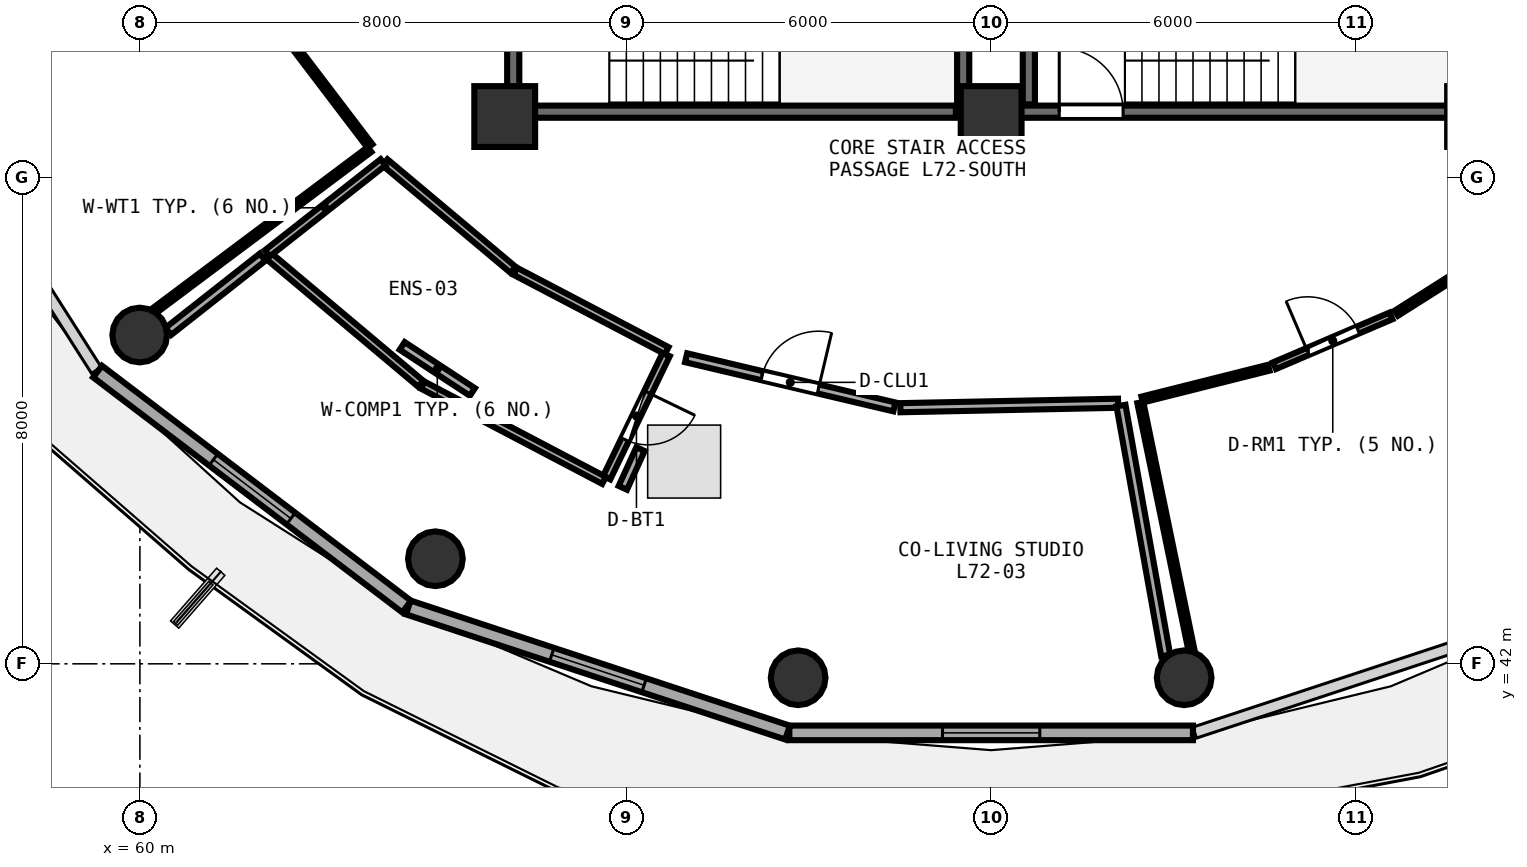
"""IFC4 building model, lengths in metres.
Left out: names, types, materials, properties, quantities, classifications, styles, units other than length and angle.
Written with IfcOpenShell. Run it as: python <this file> out.ifc"""

import sys

from ifc_helpers import new_model, si_unit, direction, frame, frame_2d, origin, origin_2d, place, context, subcontext, project, spatial, rectangle, circle, extrude, element, fill, save


model = new_model("IFC4")
c1 = context("Model", 3, precision=1e-05, world=origin(), true_north=direction((0.0, 1.0)))
c2 = subcontext(c1, "Body", "Model", "MODEL_VIEW")
j1 = project(units=[si_unit("LENGTHUNIT", "METRE"), si_unit("PLANEANGLEUNIT", "RADIAN")], contexts=[c1])
p1 = place(None, origin())
s1 = spatial("IfcSite", under=j1, at=p1, CompositionType="ELEMENT")
p2 = place(p1, origin())
s2 = spatial("IfcBuilding", under=s1, at=p2, CompositionType="ELEMENT")
p3 = place(p2, frame((0.0, 0.0, 282.45)))
s3 = spatial("IfcBuildingStorey", under=s2, at=p3, CompositionType="ELEMENT", Elevation=282.45)
for number, where, z_axis, x_axis in (
    (1, (66.0, 51.0, 0.0), (0.0, 0.0, 1.0), (1.0, 0.0, 0.0)),
    (2, (74.0, 51.0, 0.0), (0.0, 0.0, 1.0), (1.0, 0.0, 0.0)),
):
    element("IfcColumn", number, at=place(p3, frame(where, z_axis=z_axis, x_axis=x_axis)), inside=s3, PredefinedType="PILASTER", context=c2, shape_type="SweptSolid", body=[
        extrude(rectangle(XDim=1.0, YDim=1.0, at=origin_2d()), origin(), (0.0, 0.0, 1.0), 3.75),
    ])
for number, where, z_axis, x_axis in (
    (3, (59.997, 47.407, 0.0), (0.0, 0.0, 1.0), (1.0, 0.0, 0.0)),
    (4, (64.86, 43.728, 0.0), (0.0, 0.0, 1.0), (1.0, 0.0, 0.0)),
    (5, (70.826, 41.771, 0.0), (0.0, 0.0, 1.0), (1.0, 0.0, 0.0)),
    (6, (77.174, 41.771, 0.0), (0.0, 0.0, 1.0), (1.0, 0.0, 0.0)),
):
    element("IfcColumn", number, at=place(p3, frame(where, z_axis=z_axis, x_axis=x_axis)), inside=s3, PredefinedType="COLUMN", context=c2, shape_type="SweptSolid", body=[
        extrude(circle(Radius=0.45, at=origin_2d()), origin(), (0.0, 0.0, 1.0), 3.75),
    ])
p4 = place(p3, frame((59.304, 46.806, 0.0), z_axis=(0.0, 0.0, 1.0), x_axis=(0.796010444211, -0.605282886514, 0.0)))
e7 = element("IfcWall", 7, at=p4, inside=s3, PredefinedType="SOLIDWALL", context=c2, shape_type="SweptSolid", body=[
    extrude(rectangle(XDim=6.387, YDim=0.24, at=frame_2d((3.194, 0.0))), origin(), (0.0, 0.0, 1.0), 3.475),
])
p5 = place(p4, frame((2.394, 0.0, 0.85)))
e8 = element("IfcOpeningElement", 8, at=p5, cuts=e7, PredefinedType="OPENING", context=c2, shape_type="SweptSolid", body=[
    extrude(rectangle(XDim=1.6, YDim=1.45, at=frame_2d((0.8, 0.725))), frame((0.0, 0.13, 0.0), z_axis=(0.0, -1.0, 0.0), x_axis=(1.0, 0.0, 0.0)), (0.0, 0.0, 1.0), 0.26),
])
p6 = place(p3, frame((64.414, 42.927, 0.0), z_axis=(0.0, 0.0, 1.0), x_axis=(0.949663708393, -0.313271193954, 0.0)))
e9 = element("IfcWall", 9, at=p6, inside=s3, PredefinedType="SOLIDWALL", context=c2, shape_type="SweptSolid", body=[
    extrude(rectangle(XDim=6.568, YDim=0.24, at=frame_2d((3.284, 0.0))), origin(), (0.0, 0.0, 1.0), 3.475),
])
p7 = place(p6, frame((2.484, 0.0, 0.85)))
e10 = element("IfcOpeningElement", 10, at=p7, cuts=e9, PredefinedType="OPENING", context=c2, shape_type="SweptSolid", body=[
    extrude(rectangle(XDim=1.6, YDim=1.45, at=frame_2d((0.8, 0.725))), frame((0.0, 0.13, 0.0), z_axis=(0.0, -1.0, 0.0), x_axis=(1.0, 0.0, 0.0)), (0.0, 0.0, 1.0), 0.26),
])
p8 = place(p3, frame((70.681, 40.864, 0.0), z_axis=(0.0, 0.0, 1.0), x_axis=(1.0, 0.0, 0.0)))
e11 = element("IfcWall", 11, at=p8, inside=s3, PredefinedType="SOLIDWALL", context=c2, shape_type="SweptSolid", body=[
    extrude(rectangle(XDim=6.638, YDim=0.24, at=frame_2d((3.319, 0.0))), origin(), (0.0, 0.0, 1.0), 3.475),
])
p9 = place(p8, frame((2.519, 0.0, 0.85)))
e12 = element("IfcOpeningElement", 12, at=p9, cuts=e11, PredefinedType="OPENING", context=c2, shape_type="SweptSolid", body=[
    extrude(rectangle(XDim=1.6, YDim=1.45, at=frame_2d((0.8, 0.725))), frame((0.0, 0.13, 0.0), z_axis=(0.0, -1.0, 0.0), x_axis=(1.0, 0.0, 0.0)), (0.0, 0.0, 1.0), 0.26),
])
p10 = place(p3, frame((74.0, 51.08, 0.0), z_axis=(0.0, 0.0, 1.0), x_axis=(1.0, 0.0, 0.0)))
e13 = element("IfcWall", 13, at=p10, inside=s3, PredefinedType="SHEAR", context=c2, shape_type="SweptSolid", body=[
    extrude(rectangle(XDim=7.9, YDim=0.2, at=frame_2d((3.95, 0.0))), origin(), (0.0, 0.0, 1.0), 3.49),
])
p11 = place(p10, frame((1.12, 0.0, 0.0)))
e14 = element("IfcOpeningElement", 14, at=p11, cuts=e13, PredefinedType="OPENING", context=c2, shape_type="SweptSolid", body=[
    extrude(rectangle(XDim=1.05, YDim=2.1, at=frame_2d((0.525, 1.05))), frame((0.0, 0.11, 0.0), z_axis=(0.0, -1.0, 0.0), x_axis=(1.0, 0.0, 0.0)), (0.0, 0.0, 1.0), 0.22),
])
p12 = place(p3, frame((74.62, 54.27, 0.0), z_axis=(0.0, 0.0, 1.0), x_axis=(0.0, -1.0, 0.0)))
e15 = element("IfcWall", 15, at=p12, inside=s3, PredefinedType="SHEAR", context=c2, shape_type="SweptSolid", body=[
    extrude(rectangle(XDim=3.07, YDim=0.2, at=frame_2d((1.535, 0.0))), origin(), (0.0, 0.0, 1.0), 3.49),
])
p13 = place(p3, frame((66.26, 51.08, 0.0), z_axis=(0.0, 0.0, 1.0), x_axis=(1.0, 0.0, 0.0)))
e16 = element("IfcWall", 16, at=p13, inside=s3, PredefinedType="SHEAR", context=c2, shape_type="SweptSolid", body=[
    extrude(rectangle(XDim=7.16, YDim=0.2, at=frame_2d((3.58, 0.0))), origin(), (0.0, 0.0, 1.0), 3.49),
])
p14 = place(p3, frame((73.54, 51.2, 0.0), z_axis=(0.0, 0.0, 1.0), x_axis=(0.0, 1.0, 0.0)))
e17 = element("IfcWall", 17, at=p14, inside=s3, PredefinedType="SHEAR", context=c2, shape_type="SweptSolid", body=[
    extrude(rectangle(XDim=3.07, YDim=0.2, at=frame_2d((1.535, 0.0))), origin(), (0.0, 0.0, 1.0), 3.49),
])
p15 = place(p3, frame((66.14, 54.27, 0.0), z_axis=(0.0, 0.0, 1.0), x_axis=(0.0, -1.0, 0.0)))
e18 = element("IfcWall", 18, at=p15, inside=s3, PredefinedType="SHEAR", context=c2, shape_type="SweptSolid", body=[
    extrude(rectangle(XDim=3.07, YDim=0.2, at=frame_2d((1.535, 0.0))), origin(), (0.0, 0.0, 1.0), 3.49),
])
p16 = place(p15, frame((1.01, 0.0, 0.0)))
e19 = element("IfcOpeningElement", 19, at=p16, cuts=e18, PredefinedType="OPENING", context=c2, shape_type="SweptSolid", body=[
    extrude(rectangle(XDim=1.05, YDim=2.1, at=frame_2d((0.525, 1.05))), frame((0.0, 0.11, 0.0), z_axis=(0.0, -1.0, 0.0), x_axis=(1.0, 0.0, 0.0)), (0.0, 0.0, 1.0), 0.22),
])
p17 = place(p3, frame((68.656, 47.087, 0.0), z_axis=(0.0, 0.0, 1.0), x_axis=(-0.435107089182, -0.900378709735, 0.0)))
e20 = element("IfcWall", 20, at=p17, inside=s3, PredefinedType="PLUMBINGWALL", context=c2, shape_type="SweptSolid", body=[
    extrude(rectangle(XDim=2.25, YDim=0.13, at=frame_2d((1.125, 0.0))), origin(), (0.0, 0.0, 1.0), 3.175),
])
p18 = place(p17, frame((0.695, 0.0, 0.0)))
e21 = element("IfcOpeningElement", 21, at=p18, cuts=e20, PredefinedType="OPENING", context=c2, shape_type="SweptSolid", body=[
    extrude(rectangle(XDim=0.86, YDim=2.05, at=frame_2d((0.43, 1.025))), frame((0.0, 0.075, 0.0), z_axis=(0.0, -1.0, 0.0), x_axis=(1.0, 0.0, 0.0)), (0.0, 0.0, 1.0), 0.15),
])
p19 = place(p3, frame((68.983, 47.033, 0.0), z_axis=(0.0, 0.0, 1.0), x_axis=(0.973265021884, -0.229684995542, 0.0)))
e22 = element("IfcWall", 22, at=p19, inside=s3, PredefinedType="PARTITIONING", context=c2, shape_type="SweptSolid", body=[
    extrude(rectangle(XDim=3.519, YDim=0.15, at=frame_2d((1.76, 0.0))), origin(), (0.0, 0.0, 1.0), 3.075),
])
p20 = place(p19, frame((1.285, 0.0, 0.0)))
e23 = element("IfcOpeningElement", 23, at=p20, cuts=e22, PredefinedType="OPENING", context=c2, shape_type="SweptSolid", body=[
    extrude(rectangle(XDim=0.95, YDim=2.08, at=frame_2d((0.475, 1.04))), frame((0.0, 0.085, 0.0), z_axis=(0.0, -1.0, 0.0), x_axis=(1.0, 0.0, 0.0)), (0.0, 0.0, 1.0), 0.17),
])
p21 = place(p3, frame((78.66, 46.903, 0.0), z_axis=(0.0, 0.0, 1.0), x_axis=(0.919508345424, 0.39307048057, 0.0)))
e24 = element("IfcWall", 24, at=p21, inside=s3, PredefinedType="PARTITIONING", context=c2, shape_type="SweptSolid", body=[
    extrude(rectangle(XDim=2.083, YDim=0.12, at=frame_2d((1.042, 0.0))), origin(), (0.0, 0.0, 1.0), 3.48),
])
p22 = place(p21, frame((0.592, 0.0, 0.0)))
e25 = element("IfcOpeningElement", 25, at=p22, cuts=e24, PredefinedType="OPENING", context=c2, shape_type="SweptSolid", body=[
    extrude(rectangle(XDim=0.9, YDim=2.08, at=frame_2d((0.45, 1.04))), frame((0.0, 0.07, 0.0), z_axis=(0.0, -1.0, 0.0), x_axis=(1.0, 0.0, 0.0)), (0.0, 0.0, 1.0), 0.14),
])
p23 = place(p3, frame((62.565, 52.117, 0.0), z_axis=(0.0, 0.0, 1.0), x_axis=(0.605473441765, -0.795865510823, 0.0)))
e26 = element("IfcWall", 26, at=p23, inside=s3, PredefinedType="PARTITIONING", context=c2, shape_type="SweptSolid", body=[
    extrude(rectangle(XDim=2.014, YDim=0.1, at=frame_2d((1.007, 0.0))), origin(), (0.0, 0.0, 1.0), 3.075),
])
p24 = place(p3, frame((63.777, 50.458, 0.0), z_axis=(0.0, 0.0, 1.0), x_axis=(-0.800384816546, -0.599486568191, 0.0)))
e27 = element("IfcWall", 27, at=p24, inside=s3, PredefinedType="PARTITIONING", context=c2, shape_type="SweptSolid", body=[
    extrude(rectangle(XDim=4.414, YDim=0.1, at=frame_2d((2.207, 0.0))), origin(), (0.0, 0.0, 1.0), 3.175),
])
p25 = place(p3, frame((64.03, 50.247, 0.0), z_axis=(0.0, 0.0, 1.0), x_axis=(0.766167599315, -0.642640809286, 0.0)))
e28 = element("IfcWall", 28, at=p25, inside=s3, PredefinedType="PLUMBINGWALL", context=c2, shape_type="SweptSolid", body=[
    extrude(rectangle(XDim=2.753, YDim=0.13, at=frame_2d((1.376, 0.0))), origin(), (0.0, 0.0, 1.0), 3.075),
])
p26 = place(p3, frame((66.173, 48.456, 0.0), z_axis=(0.0, 0.0, 1.0), x_axis=(0.885795858503, -0.464075098512, 0.0)))
e29 = element("IfcWall", 29, at=p26, inside=s3, PredefinedType="PLUMBINGWALL", context=c2, shape_type="SweptSolid", body=[
    extrude(rectangle(XDim=2.813, YDim=0.13, at=frame_2d((1.406, 0.0))), origin(), (0.0, 0.0, 1.0), 3.235),
])
p27 = place(p3, frame((67.633, 45.016, 0.0), z_axis=(0.0, 0.0, 1.0), x_axis=(-0.885210583291, 0.465190523581, 0.0)))
e30 = element("IfcWall", 30, at=p27, inside=s3, PredefinedType="PLUMBINGWALL", context=c2, shape_type="SweptSolid", body=[
    extrude(rectangle(XDim=3.367, YDim=0.13, at=frame_2d((1.684, 0.0))), origin(), (0.0, 0.0, 1.0), 3.075),
])
p28 = place(p3, frame((64.62, 46.605, 0.0), z_axis=(0.0, 0.0, 1.0), x_axis=(-0.765494729633, 0.643442164382, 0.0)))
e31 = element("IfcWall", 31, at=p28, inside=s3, PredefinedType="PLUMBINGWALL", context=c2, shape_type="SweptSolid", body=[
    extrude(rectangle(XDim=3.296, YDim=0.13, at=frame_2d((1.648, 0.0))), origin(), (0.0, 0.0, 1.0), 3.075),
])
p29 = place(p3, frame((62.097, 48.751, 0.0), z_axis=(0.0, 0.0, 1.0), x_axis=(0.786076764473, 0.618128886525, 0.0)))
e32 = element("IfcWall", 32, at=p29, inside=s3, PredefinedType="PLUMBINGWALL", context=c2, shape_type="SweptSolid", body=[
    extrude(rectangle(XDim=2.42, YDim=0.13, at=frame_2d((1.21, 0.0))), origin(), (0.0, 0.0, 1.0), 3.075),
])
p30 = place(p3, frame((72.507, 46.212, 0.0), z_axis=(0.0, 0.0, 1.0), x_axis=(0.999790880908, 0.02044980325, 0.0)))
e33 = element("IfcWall", 33, at=p30, inside=s3, PredefinedType="PARTITIONING", context=c2, shape_type="SweptSolid", body=[
    extrude(rectangle(XDim=3.582, YDim=0.15, at=frame_2d((1.791, 0.0))), origin(), (0.0, 0.0, 1.0), 3.075),
])
p31 = place(p3, frame((76.135, 46.247, 0.0), z_axis=(0.0, 0.0, 1.0), x_axis=(0.176199339585, -0.984354505618, 0.0)))
e34 = element("IfcWall", 34, at=p31, inside=s3, PredefinedType="PARTITIONING", context=c2, shape_type="SweptSolid", body=[
    extrude(rectangle(XDim=4.176, YDim=0.15, at=frame_2d((2.088, 0.0))), origin(), (0.0, 0.0, 1.0), 3.075),
])
p32 = place(p3, frame((60.468, 47.468, 0.0), z_axis=(0.0, 0.0, 1.0), x_axis=(0.785768578647, 0.618520606618, 0.0)))
e35 = element("IfcWall", 35, at=p32, inside=s3, PredefinedType="PARTITIONING", context=c2, shape_type="SweptSolid", body=[
    extrude(rectangle(XDim=1.974, YDim=0.15, at=frame_2d((0.987, 0.0))), origin(), (0.0, 0.0, 1.0), 3.075),
])
p33 = place(p3, frame((64.314, 47.228, 0.0), z_axis=(0.0, 0.0, 1.0), x_axis=(0.836108744157, -0.54856373189, 0.0)))
e36 = element("IfcWall", 36, at=p33, inside=s3, PredefinedType="PARTITIONING", context=c2, shape_type="SweptSolid", body=[
    extrude(rectangle(XDim=1.381, YDim=0.15, at=frame_2d((0.69, 0.0))), origin(), (0.0, 0.0, 1.0), 3.075),
])
p34 = place(p3, frame((67.943, 44.894, 0.0), z_axis=(0.0, 0.0, 1.0), x_axis=(0.415116627058, 0.909768204511, 0.0)))
e37 = element("IfcWall", 37, at=p34, inside=s3, PredefinedType="PARTITIONING", context=c2, shape_type="SweptSolid", body=[
    extrude(rectangle(XDim=0.7, YDim=0.15, at=frame_2d((0.35, 0.0))), origin(), (0.0, 0.0, 1.0), 3.48),
])
p35 = place(p3, frame((76.484, 46.346, 0.0), z_axis=(0.0, 0.0, 1.0), x_axis=(0.969827312174, 0.243792913272, 0.0)))
e38 = element("IfcWall", 38, at=p35, inside=s3, PredefinedType="PARTITIONING", context=c2, shape_type="SweptSolid", body=[
    extrude(rectangle(XDim=2.147, YDim=0.1, at=frame_2d((1.073, 0.0))), origin(), (0.0, 0.0, 1.0), 3.48),
])
p36 = place(p3, frame((80.665, 47.766, 0.0), z_axis=(0.0, 0.0, 1.0), x_axis=(0.844856002064, 0.534993771717, 0.0)))
e39 = element("IfcWall", 39, at=p36, inside=s3, PredefinedType="PARTITIONING", context=c2, shape_type="SweptSolid", body=[
    extrude(rectangle(XDim=2.092, YDim=0.1, at=frame_2d((1.046, 0.0))), origin(), (0.0, 0.0, 1.0), 3.075),
])
p37 = place(p3, frame((77.293, 42.23, 0.0), z_axis=(0.0, 0.0, 1.0), x_axis=(-0.202308141573, 0.979321916355, 0.0)))
e40 = element("IfcWall", 40, at=p37, inside=s3, PredefinedType="PARTITIONING", context=c2, shape_type="SweptSolid", body=[
    extrude(rectangle(XDim=4.153, YDim=0.1, at=frame_2d((2.076, 0.0))), origin(), (0.0, 0.0, 1.0), 3.175),
])
p38 = place(p5, origin())
e41 = element("IfcWindow", 41, at=p38, inside=s3, PartitioningType="SINGLE_PANEL", PredefinedType="WINDOW", context=c2, shape_type="SweptSolid", body=[
    extrude(rectangle(XDim=1.6, YDim=1.45, at=frame_2d((0.8, 0.725))), frame((0.0, 0.03, 0.0), z_axis=(0.0, -1.0, 0.0), x_axis=(1.0, 0.0, 0.0)), (0.0, 0.0, 1.0), 0.06),
])
fill(e8, e41)
p39 = place(p7, origin())
e42 = element("IfcWindow", 42, at=p39, inside=s3, PartitioningType="SINGLE_PANEL", PredefinedType="WINDOW", context=c2, shape_type="SweptSolid", body=[
    extrude(rectangle(XDim=1.6, YDim=1.45, at=frame_2d((0.8, 0.725))), frame((0.0, 0.03, 0.0), z_axis=(0.0, -1.0, 0.0), x_axis=(1.0, 0.0, 0.0)), (0.0, 0.0, 1.0), 0.06),
])
fill(e10, e42)
p40 = place(p9, origin())
e43 = element("IfcWindow", 43, at=p40, inside=s3, PartitioningType="SINGLE_PANEL", PredefinedType="WINDOW", context=c2, shape_type="SweptSolid", body=[
    extrude(rectangle(XDim=1.6, YDim=1.45, at=frame_2d((0.8, 0.725))), frame((0.0, 0.03, 0.0), z_axis=(0.0, -1.0, 0.0), x_axis=(1.0, 0.0, 0.0)), (0.0, 0.0, 1.0), 0.06),
])
fill(e12, e43)
p41 = place(p11, origin())
e44 = element("IfcDoor", 44, at=p41, inside=s3, OperationType="SINGLE_SWING_LEFT", PredefinedType="DOOR", context=c2, shape_type="SweptSolid", body=[
    extrude(rectangle(XDim=1.05, YDim=2.1, at=frame_2d((0.525, 1.05))), frame((0.0, 0.025, 0.0), z_axis=(0.0, -1.0, 0.0), x_axis=(1.0, 0.0, 0.0)), (0.0, 0.0, 1.0), 0.05),
])
fill(e14, e44)
p42 = place(p18, origin())
e45 = element("IfcDoor", 45, at=p42, inside=s3, OperationType="SINGLE_SWING_LEFT", PredefinedType="DOOR", context=c2, shape_type="SweptSolid", body=[
    extrude(rectangle(XDim=0.86, YDim=2.05, at=frame_2d((0.43, 1.025))), frame((0.0, 0.025, 0.0), z_axis=(0.0, -1.0, 0.0), x_axis=(1.0, 0.0, 0.0)), (0.0, 0.0, 1.0), 0.05),
])
fill(e21, e45)
p43 = place(p20, origin())
e46 = element("IfcDoor", 46, at=p43, inside=s3, OperationType="SINGLE_SWING_RIGHT", PredefinedType="DOOR", context=c2, shape_type="SweptSolid", body=[
    extrude(rectangle(XDim=0.95, YDim=2.08, at=frame_2d((0.475, 1.04))), frame((0.0, 0.025, 0.0), z_axis=(0.0, -1.0, 0.0), x_axis=(1.0, 0.0, 0.0)), (0.0, 0.0, 1.0), 0.05),
])
fill(e23, e46)
p44 = place(p22, origin())
e47 = element("IfcDoor", 47, at=p44, inside=s3, OperationType="SINGLE_SWING_LEFT", PredefinedType="DOOR", context=c2, shape_type="SweptSolid", body=[
    extrude(rectangle(XDim=0.9, YDim=2.08, at=frame_2d((0.45, 1.04))), frame((0.0, 0.025, 0.0), z_axis=(0.0, -1.0, 0.0), x_axis=(1.0, 0.0, 0.0)), (0.0, 0.0, 1.0), 0.05),
])
fill(e25, e47)
save(model, sys.argv[1])
